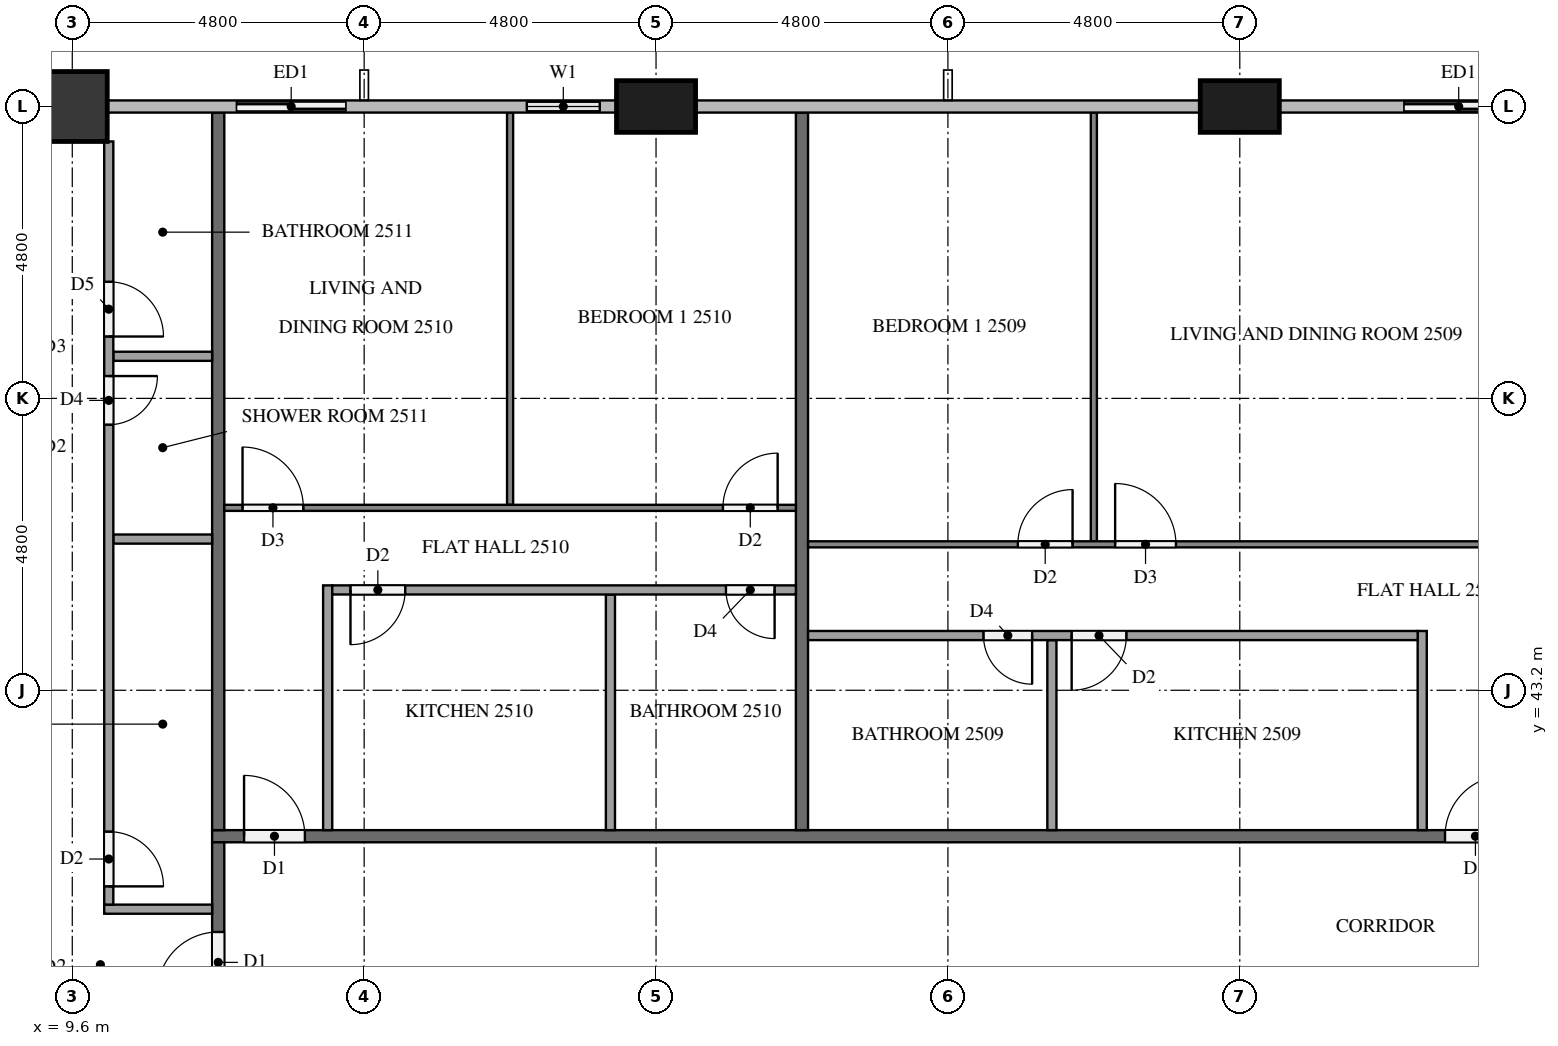
"""IFC4 building model, lengths in metres.
Left out: names, types, materials, properties, quantities, classifications, styles, units other than length and angle.
Written with IfcOpenShell. Run it as: python <this file> out.ifc"""

import sys

from ifc_helpers import new_model, si_unit, direction, frame, frame_2d, origin, origin_2d, place, context, subcontext, project, spatial, rectangle, extrude, element, fill, save


model = new_model("IFC4")
c1 = context("Model", 3, precision=1e-05, world=origin(), true_north=direction((0.0, 1.0)))
c2 = subcontext(c1, "Body", "Model", "MODEL_VIEW")
j1 = project(units=[si_unit("LENGTHUNIT", "METRE"), si_unit("PLANEANGLEUNIT", "RADIAN")], contexts=[c1])
p1 = place(None, origin())
s1 = spatial("IfcSite", under=j1, at=p1, CompositionType="ELEMENT")
p2 = place(p1, origin())
s2 = spatial("IfcBuilding", under=s1, at=p2, CompositionType="ELEMENT")
p3 = place(p2, frame((0.0, 0.0, 99.7)))
s3 = spatial("IfcBuildingStorey", under=s2, at=p3, CompositionType="ELEMENT", Elevation=99.7)
for number, where, z_axis, x_axis in (
    (1, (28.8, 52.8, 0.0), (0.0, 0.0, 1.0), (1.0, 0.0, 0.0)),
    (2, (19.2, 52.8, 0.0), (0.0, 0.0, 1.0), (1.0, 0.0, 0.0)),
):
    element("IfcColumn", number, at=place(p3, frame(where, z_axis=z_axis, x_axis=x_axis)), inside=s3, PredefinedType="COLUMN", context=c2, shape_type="SweptSolid", body=[
        extrude(rectangle(XDim=1.3, YDim=0.85, at=origin_2d()), origin(), (0.0, 0.0, 1.0), 3.2),
    ])
p4 = place(p3, frame((9.6, 52.8, 0.0), z_axis=(0.0, 0.0, 1.0), x_axis=(1.0, 0.0, 0.0)))
e3 = element("IfcColumn", 3, at=p4, inside=s3, PredefinedType="COLUMN", context=c2, shape_type="SweptSolid", body=[
    extrude(rectangle(XDim=1.15, YDim=1.15, at=origin_2d()), origin(), (0.0, 0.0, 1.0), 3.2),
])
p5 = place(p3, frame((33.6, 52.8, 0.0), z_axis=(0.0, 0.0, 1.0), x_axis=(-1.0, 0.0, 0.0)))
e4 = element("IfcWall", 4, at=p5, inside=s3, PredefinedType="SOLIDWALL", context=c2, shape_type="SweptSolid", body=[
    extrude(rectangle(XDim=2.4, YDim=0.15, at=frame_2d((1.2, 0.0))), origin(), (0.0, 0.0, 1.0), 3.2),
])
p6 = place(p5, frame((0.3, 0.0, 0.0)))
e5 = element("IfcOpeningElement", 5, at=p6, cuts=e4, PredefinedType="OPENING", context=c2, shape_type="SweptSolid", body=[
    extrude(rectangle(XDim=1.8, YDim=2.4, at=frame_2d((0.9, 1.2))), frame((0.0, 0.085, 0.0), z_axis=(0.0, -1.0, 0.0), x_axis=(1.0, 0.0, 0.0)), (0.0, 0.0, 1.0), 0.17),
])
p7 = place(p3, frame((18.55, 52.8, 0.0), z_axis=(0.0, 0.0, 1.0), x_axis=(-1.0, 0.0, 0.0)))
e6 = element("IfcWall", 6, at=p7, inside=s3, PredefinedType="SOLIDWALL", context=c2, shape_type="SweptSolid", body=[
    extrude(rectangle(XDim=1.75, YDim=0.15, at=frame_2d((0.875, 0.0))), origin(), (0.0, 0.0, 1.0), 3.2),
])
p8 = place(p7, frame((0.275, 0.0, 0.9)))
e7 = element("IfcOpeningElement", 7, at=p8, cuts=e6, PredefinedType="OPENING", context=c2, shape_type="SweptSolid", body=[
    extrude(rectangle(XDim=1.2, YDim=1.4, at=frame_2d((0.6, 0.7))), frame((0.0, 0.085, 0.0), z_axis=(0.0, -1.0, 0.0), x_axis=(1.0, 0.0, 0.0)), (0.0, 0.0, 1.0), 0.17),
])
p9 = place(p3, frame((14.4, 52.8, 0.0), z_axis=(0.0, 0.0, 1.0), x_axis=(-1.0, 0.0, 0.0)))
e8 = element("IfcWall", 8, at=p9, inside=s3, PredefinedType="SOLIDWALL", context=c2, shape_type="SweptSolid", body=[
    extrude(rectangle(XDim=2.4, YDim=0.15, at=frame_2d((1.2, 0.0))), origin(), (0.0, 0.0, 1.0), 3.2),
])
p10 = place(p9, frame((0.3, 0.0, 0.0)))
e9 = element("IfcOpeningElement", 9, at=p10, cuts=e8, PredefinedType="OPENING", context=c2, shape_type="SweptSolid", body=[
    extrude(rectangle(XDim=1.8, YDim=2.4, at=frame_2d((0.9, 1.2))), frame((0.0, 0.085, 0.0), z_axis=(0.0, -1.0, 0.0), x_axis=(1.0, 0.0, 0.0)), (0.0, 0.0, 1.0), 0.17),
])
p11 = place(p3, frame((11.9, 40.8, 0.0), z_axis=(0.0, 0.0, 1.0), x_axis=(1.0, 0.0, 0.0)))
e10 = element("IfcWall", 10, at=p11, inside=s3, PredefinedType="PARTITIONING", context=c2, shape_type="SweptSolid", body=[
    extrude(rectangle(XDim=38.6, YDim=0.2, at=frame_2d((19.3, 0.0))), origin(), (0.0, 0.0, 1.0), 3.2),
])
p12 = place(p11, frame((22.125, 0.0, 0.0)))
e11 = element("IfcOpeningElement", 11, at=p12, cuts=e10, PredefinedType="OPENING", context=c2, shape_type="SweptSolid", body=[
    extrude(rectangle(XDim=1.0, YDim=2.1, at=frame_2d((0.5, 1.05))), frame((0.0, 0.11, 0.0), z_axis=(0.0, -1.0, 0.0), x_axis=(1.0, 0.0, 0.0)), (0.0, 0.0, 1.0), 0.22),
])
p13 = place(p11, frame((20.275, 0.0, 0.0)))
e12 = element("IfcOpeningElement", 12, at=p13, cuts=e10, PredefinedType="OPENING", context=c2, shape_type="SweptSolid", body=[
    extrude(rectangle(XDim=1.0, YDim=2.1, at=frame_2d((0.5, 1.05))), frame((0.0, 0.11, 0.0), z_axis=(0.0, -1.0, 0.0), x_axis=(1.0, 0.0, 0.0)), (0.0, 0.0, 1.0), 0.22),
])
p14 = place(p11, frame((0.525, 0.0, 0.0)))
e13 = element("IfcOpeningElement", 13, at=p14, cuts=e10, PredefinedType="OPENING", context=c2, shape_type="SweptSolid", body=[
    extrude(rectangle(XDim=1.0, YDim=2.1, at=frame_2d((0.5, 1.05))), frame((0.0, 0.11, 0.0), z_axis=(0.0, -1.0, 0.0), x_axis=(1.0, 0.0, 0.0)), (0.0, 0.0, 1.0), 0.22),
])
p15 = place(p3, frame((12.0, 37.9, 0.0), z_axis=(0.0, 0.0, 1.0), x_axis=(0.0, 1.0, 0.0)))
e14 = element("IfcWall", 14, at=p15, inside=s3, PredefinedType="PARTITIONING", context=c2, shape_type="SweptSolid", body=[
    extrude(rectangle(XDim=2.8, YDim=0.2, at=frame_2d((1.4, 0.0))), origin(), (0.0, 0.0, 1.0), 3.2),
])
p16 = place(p15, frame((0.325, 0.0, 0.0)))
e15 = element("IfcOpeningElement", 15, at=p16, cuts=e14, PredefinedType="OPENING", context=c2, shape_type="SweptSolid", body=[
    extrude(rectangle(XDim=1.0, YDim=2.1, at=frame_2d((0.5, 1.05))), frame((0.0, 0.11, 0.0), z_axis=(0.0, -1.0, 0.0), x_axis=(1.0, 0.0, 0.0)), (0.0, 0.0, 1.0), 0.22),
])
for number, where, z_axis, x_axis in (
    (16, (21.6, 52.7, 0.0), (0.0, 0.0, 1.0), (0.0, -1.0, 0.0)),
    (17, (12.0, 52.7, 0.0), (0.0, 0.0, 1.0), (0.0, -1.0, 0.0)),
):
    element("IfcWall", number, at=place(p3, frame(where, z_axis=z_axis, x_axis=x_axis)), inside=s3, PredefinedType="PARTITIONING", context=c2, shape_type="SweptSolid", body=[
        extrude(rectangle(XDim=11.8, YDim=0.2, at=frame_2d((5.9, 0.0))), origin(), (0.0, 0.0, 1.0), 3.2),
    ])
p17 = place(p3, frame((26.4, 45.65, 0.0), z_axis=(0.0, 0.0, 1.0), x_axis=(0.0, 1.0, 0.0)))
e18 = element("IfcWall", 18, at=p17, inside=s3, PredefinedType="PARTITIONING", context=c2, shape_type="SweptSolid", body=[
    extrude(rectangle(XDim=7.05, YDim=0.1, at=frame_2d((3.525, 0.0))), origin(), (0.0, 0.0, 1.0), 3.2),
])
p18 = place(p3, frame((21.7, 45.6, 0.0), z_axis=(0.0, 0.0, 1.0), x_axis=(1.0, 0.0, 0.0)))
e19 = element("IfcWall", 19, at=p18, inside=s3, PredefinedType="PARTITIONING", context=c2, shape_type="SweptSolid", body=[
    extrude(rectangle(XDim=11.8, YDim=0.1, at=frame_2d((5.9, 0.0))), origin(), (0.0, 0.0, 1.0), 3.2),
])
p19 = place(p18, frame((5.05, 0.0, 0.0)))
e20 = element("IfcOpeningElement", 20, at=p19, cuts=e19, PredefinedType="OPENING", context=c2, shape_type="SweptSolid", body=[
    extrude(rectangle(XDim=1.0, YDim=2.1, at=frame_2d((0.5, 1.05))), frame((0.0, 0.06, 0.0), z_axis=(0.0, -1.0, 0.0), x_axis=(1.0, 0.0, 0.0)), (0.0, 0.0, 1.0), 0.12),
])
p20 = place(p18, frame((3.45, 0.0, 0.0)))
e21 = element("IfcOpeningElement", 21, at=p20, cuts=e19, PredefinedType="OPENING", context=c2, shape_type="SweptSolid", body=[
    extrude(rectangle(XDim=0.9, YDim=2.1, at=frame_2d((0.45, 1.05))), frame((0.0, 0.06, 0.0), z_axis=(0.0, -1.0, 0.0), x_axis=(1.0, 0.0, 0.0)), (0.0, 0.0, 1.0), 0.12),
])
p21 = place(p3, frame((25.71, 40.9, 0.0), z_axis=(0.0, 0.0, 1.0), x_axis=(0.0, 1.0, 0.0)))
e22 = element("IfcWall", 22, at=p21, inside=s3, PredefinedType="PARTITIONING", context=c2, shape_type="SweptSolid", body=[
    extrude(rectangle(XDim=3.125, YDim=0.15, at=frame_2d((1.562, 0.0))), origin(), (0.0, 0.0, 1.0), 3.2),
])
p22 = place(p3, frame((31.8, 40.9, 0.0), z_axis=(0.0, 0.0, 1.0), x_axis=(0.0, 1.0, 0.0)))
e23 = element("IfcWall", 23, at=p22, inside=s3, PredefinedType="PARTITIONING", context=c2, shape_type="SweptSolid", body=[
    extrude(rectangle(XDim=3.275, YDim=0.15, at=frame_2d((1.638, 0.0))), origin(), (0.0, 0.0, 1.0), 3.2),
])
p23 = place(p3, frame((31.725, 44.1, 0.0), z_axis=(0.0, 0.0, 1.0), x_axis=(-1.0, 0.0, 0.0)))
e24 = element("IfcWall", 24, at=p23, inside=s3, PredefinedType="PARTITIONING", context=c2, shape_type="SweptSolid", body=[
    extrude(rectangle(XDim=10.025, YDim=0.15, at=frame_2d((5.013, 0.0))), origin(), (0.0, 0.0, 1.0), 3.2),
])
p24 = place(p23, frame((4.79, 0.0, 0.0)))
e25 = element("IfcOpeningElement", 25, at=p24, cuts=e24, PredefinedType="OPENING", context=c2, shape_type="SweptSolid", body=[
    extrude(rectangle(XDim=0.9, YDim=2.1, at=frame_2d((0.45, 1.05))), frame((0.0, 0.085, 0.0), z_axis=(0.0, -1.0, 0.0), x_axis=(1.0, 0.0, 0.0)), (0.0, 0.0, 1.0), 0.17),
])
p25 = place(p23, frame((6.34, 0.0, 0.0)))
e26 = element("IfcOpeningElement", 26, at=p25, cuts=e24, PredefinedType="OPENING", context=c2, shape_type="SweptSolid", body=[
    extrude(rectangle(XDim=0.8, YDim=2.1, at=frame_2d((0.4, 1.05))), frame((0.0, 0.085, 0.0), z_axis=(0.0, -1.0, 0.0), x_axis=(1.0, 0.0, 0.0)), (0.0, 0.0, 1.0), 0.17),
])
p26 = place(p3, frame((16.8, 46.25, 0.0), z_axis=(0.0, 0.0, 1.0), x_axis=(0.0, 1.0, 0.0)))
e27 = element("IfcWall", 27, at=p26, inside=s3, PredefinedType="PARTITIONING", context=c2, shape_type="SweptSolid", body=[
    extrude(rectangle(XDim=6.45, YDim=0.1, at=frame_2d((3.225, 0.0))), origin(), (0.0, 0.0, 1.0), 3.2),
])
p27 = place(p3, frame((12.1, 46.2, 0.0), z_axis=(0.0, 0.0, 1.0), x_axis=(1.0, 0.0, 0.0)))
e28 = element("IfcWall", 28, at=p27, inside=s3, PredefinedType="PARTITIONING", context=c2, shape_type="SweptSolid", body=[
    extrude(rectangle(XDim=9.4, YDim=0.1, at=frame_2d((4.7, 0.0))), origin(), (0.0, 0.0, 1.0), 3.2),
])
p28 = place(p27, frame((0.3, 0.0, 0.0)))
e29 = element("IfcOpeningElement", 29, at=p28, cuts=e28, PredefinedType="OPENING", context=c2, shape_type="SweptSolid", body=[
    extrude(rectangle(XDim=1.0, YDim=2.1, at=frame_2d((0.5, 1.05))), frame((0.0, 0.06, 0.0), z_axis=(0.0, -1.0, 0.0), x_axis=(1.0, 0.0, 0.0)), (0.0, 0.0, 1.0), 0.12),
])
p29 = place(p27, frame((8.2, 0.0, 0.0)))
e30 = element("IfcOpeningElement", 30, at=p29, cuts=e28, PredefinedType="OPENING", context=c2, shape_type="SweptSolid", body=[
    extrude(rectangle(XDim=0.9, YDim=2.1, at=frame_2d((0.45, 1.05))), frame((0.0, 0.06, 0.0), z_axis=(0.0, -1.0, 0.0), x_axis=(1.0, 0.0, 0.0)), (0.0, 0.0, 1.0), 0.12),
])
p30 = place(p3, frame((18.45, 40.9, 0.0), z_axis=(0.0, 0.0, 1.0), x_axis=(0.0, 1.0, 0.0)))
e31 = element("IfcWall", 31, at=p30, inside=s3, PredefinedType="PARTITIONING", context=c2, shape_type="SweptSolid", body=[
    extrude(rectangle(XDim=3.875, YDim=0.15, at=frame_2d((1.938, 0.0))), origin(), (0.0, 0.0, 1.0), 3.2),
])
p31 = place(p3, frame((13.8, 40.9, 0.0), z_axis=(0.0, 0.0, 1.0), x_axis=(0.0, 1.0, 0.0)))
e32 = element("IfcWall", 32, at=p31, inside=s3, PredefinedType="PARTITIONING", context=c2, shape_type="SweptSolid", body=[
    extrude(rectangle(XDim=4.025, YDim=0.15, at=frame_2d((2.013, 0.0))), origin(), (0.0, 0.0, 1.0), 3.2),
])
p32 = place(p3, frame((21.5, 44.85, 0.0), z_axis=(0.0, 0.0, 1.0), x_axis=(-1.0, 0.0, 0.0)))
e33 = element("IfcWall", 33, at=p32, inside=s3, PredefinedType="PARTITIONING", context=c2, shape_type="SweptSolid", body=[
    extrude(rectangle(XDim=7.625, YDim=0.15, at=frame_2d((3.812, 0.0))), origin(), (0.0, 0.0, 1.0), 3.2),
])
p33 = place(p32, frame((6.425, 0.0, 0.0)))
e34 = element("IfcOpeningElement", 34, at=p33, cuts=e33, PredefinedType="OPENING", context=c2, shape_type="SweptSolid", body=[
    extrude(rectangle(XDim=0.9, YDim=2.1, at=frame_2d((0.45, 1.05))), frame((0.0, 0.085, 0.0), z_axis=(0.0, -1.0, 0.0), x_axis=(1.0, 0.0, 0.0)), (0.0, 0.0, 1.0), 0.17),
])
p34 = place(p32, frame((0.35, 0.0, 0.0)))
e35 = element("IfcOpeningElement", 35, at=p34, cuts=e33, PredefinedType="OPENING", context=c2, shape_type="SweptSolid", body=[
    extrude(rectangle(XDim=0.8, YDim=2.1, at=frame_2d((0.4, 1.05))), frame((0.0, 0.085, 0.0), z_axis=(0.0, -1.0, 0.0), x_axis=(1.0, 0.0, 0.0)), (0.0, 0.0, 1.0), 0.17),
])
for number, where, z_axis, x_axis in (
    (36, (11.9, 45.687, 0.0), (0.0, 0.0, 1.0), (-1.0, 0.0, 0.0)),
    (37, (11.9, 48.692, 0.0), (0.0, 0.0, 1.0), (-1.0, 0.0, 0.0)),
):
    element("IfcWall", number, at=place(p3, frame(where, z_axis=z_axis, x_axis=x_axis)), inside=s3, PredefinedType="PARTITIONING", context=c2, shape_type="SweptSolid", body=[
        extrude(rectangle(XDim=1.625, YDim=0.15, at=frame_2d((0.812, 0.0))), origin(), (0.0, 0.0, 1.0), 3.2),
    ])
p35 = place(p3, frame((11.9, 39.6, 0.0), z_axis=(0.0, 0.0, 1.0), x_axis=(-1.0, 0.0, 0.0)))
e38 = element("IfcWall", 38, at=p35, inside=s3, PredefinedType="PARTITIONING", context=c2, shape_type="SweptSolid", body=[
    extrude(rectangle(XDim=1.775, YDim=0.15, at=frame_2d((0.887, 0.0))), origin(), (0.0, 0.0, 1.0), 3.2),
])
p36 = place(p3, frame((10.2, 52.225, 0.0), z_axis=(0.0, 0.0, 1.0), x_axis=(0.0, -1.0, 0.0)))
e39 = element("IfcWall", 39, at=p36, inside=s3, PredefinedType="PARTITIONING", context=c2, shape_type="SweptSolid", body=[
    extrude(rectangle(XDim=12.55, YDim=0.15, at=frame_2d((6.275, 0.0))), origin(), (0.0, 0.0, 1.0), 3.2),
])
p37 = place(p36, frame((11.35, 0.0, 0.0)))
e40 = element("IfcOpeningElement", 40, at=p37, cuts=e39, PredefinedType="OPENING", context=c2, shape_type="SweptSolid", body=[
    extrude(rectangle(XDim=0.9, YDim=2.1, at=frame_2d((0.45, 1.05))), frame((0.0, 0.085, 0.0), z_axis=(0.0, -1.0, 0.0), x_axis=(1.0, 0.0, 0.0)), (0.0, 0.0, 1.0), 0.17),
])
p38 = place(p36, frame((3.858, 0.0, 0.0)))
e41 = element("IfcOpeningElement", 41, at=p38, cuts=e39, PredefinedType="OPENING", context=c2, shape_type="SweptSolid", body=[
    extrude(rectangle(XDim=0.8, YDim=2.1, at=frame_2d((0.4, 1.05))), frame((0.0, 0.085, 0.0), z_axis=(0.0, -1.0, 0.0), x_axis=(1.0, 0.0, 0.0)), (0.0, 0.0, 1.0), 0.17),
])
p39 = place(p36, frame((2.308, 0.0, 0.0)))
e42 = element("IfcOpeningElement", 42, at=p39, cuts=e39, PredefinedType="OPENING", context=c2, shape_type="SweptSolid", body=[
    extrude(rectangle(XDim=0.9, YDim=2.1, at=frame_2d((0.45, 1.05))), frame((0.0, 0.085, 0.0), z_axis=(0.0, -1.0, 0.0), x_axis=(1.0, 0.0, 0.0)), (0.0, 0.0, 1.0), 0.17),
])
p40 = place(p6, origin())
e43 = element("IfcDoor", 43, at=p40, inside=s3, OperationType="SLIDING_TO_LEFT", PredefinedType="DOOR", context=c2, shape_type="SweptSolid", body=[
    extrude(rectangle(XDim=1.8, YDim=2.4, at=frame_2d((0.9, 1.2))), frame((0.0, 0.025, 0.0), z_axis=(0.0, -1.0, 0.0), x_axis=(1.0, 0.0, 0.0)), (0.0, 0.0, 1.0), 0.05),
])
fill(e5, e43)
p41 = place(p8, origin())
e44 = element("IfcWindow", 44, at=p41, inside=s3, PartitioningType="SINGLE_PANEL", PredefinedType="WINDOW", context=c2, shape_type="SweptSolid", body=[
    extrude(rectangle(XDim=1.2, YDim=1.4, at=frame_2d((0.6, 0.7))), frame((0.0, 0.03, 0.0), z_axis=(0.0, -1.0, 0.0), x_axis=(1.0, 0.0, 0.0)), (0.0, 0.0, 1.0), 0.06),
])
fill(e7, e44)
p42 = place(p10, origin())
e45 = element("IfcDoor", 45, at=p42, inside=s3, OperationType="SLIDING_TO_RIGHT", PredefinedType="DOOR", context=c2, shape_type="SweptSolid", body=[
    extrude(rectangle(XDim=1.8, YDim=2.4, at=frame_2d((0.9, 1.2))), frame((0.0, 0.025, 0.0), z_axis=(0.0, -1.0, 0.0), x_axis=(1.0, 0.0, 0.0)), (0.0, 0.0, 1.0), 0.05),
])
fill(e9, e45)
p43 = place(p13, origin())
e46 = element("IfcDoor", 46, at=p43, inside=s3, OperationType="SINGLE_SWING_RIGHT", PredefinedType="DOOR", context=c2, shape_type="SweptSolid", body=[
    extrude(rectangle(XDim=1.0, YDim=2.1, at=frame_2d((0.5, 1.05))), frame((0.0, 0.025, 0.0), z_axis=(0.0, -1.0, 0.0), x_axis=(1.0, 0.0, 0.0)), (0.0, 0.0, 1.0), 0.05),
])
fill(e12, e46)
p44 = place(p14, origin())
e47 = element("IfcDoor", 47, at=p44, inside=s3, OperationType="SINGLE_SWING_LEFT", PredefinedType="DOOR", context=c2, shape_type="SweptSolid", body=[
    extrude(rectangle(XDim=1.0, YDim=2.1, at=frame_2d((0.5, 1.05))), frame((0.0, 0.025, 0.0), z_axis=(0.0, -1.0, 0.0), x_axis=(1.0, 0.0, 0.0)), (0.0, 0.0, 1.0), 0.05),
])
fill(e13, e47)
p45 = place(p16, origin())
e48 = element("IfcDoor", 48, at=p45, inside=s3, OperationType="SINGLE_SWING_LEFT", PredefinedType="DOOR", context=c2, shape_type="SweptSolid", body=[
    extrude(rectangle(XDim=1.0, YDim=2.1, at=frame_2d((0.5, 1.05))), frame((0.0, 0.025, 0.0), z_axis=(0.0, -1.0, 0.0), x_axis=(1.0, 0.0, 0.0)), (0.0, 0.0, 1.0), 0.05),
])
fill(e15, e48)
p46 = place(p19, origin())
e49 = element("IfcDoor", 49, at=p46, inside=s3, OperationType="SINGLE_SWING_LEFT", PredefinedType="DOOR", context=c2, shape_type="SweptSolid", body=[
    extrude(rectangle(XDim=1.0, YDim=2.1, at=frame_2d((0.5, 1.05))), frame((0.0, 0.025, 0.0), z_axis=(0.0, -1.0, 0.0), x_axis=(1.0, 0.0, 0.0)), (0.0, 0.0, 1.0), 0.05),
])
fill(e20, e49)
p47 = place(p20, origin())
e50 = element("IfcDoor", 50, at=p47, inside=s3, OperationType="SINGLE_SWING_RIGHT", PredefinedType="DOOR", context=c2, shape_type="SweptSolid", body=[
    extrude(rectangle(XDim=0.9, YDim=2.1, at=frame_2d((0.45, 1.05))), frame((0.0, 0.025, 0.0), z_axis=(0.0, -1.0, 0.0), x_axis=(1.0, 0.0, 0.0)), (0.0, 0.0, 1.0), 0.05),
])
fill(e21, e50)
p48 = place(p24, origin())
e51 = element("IfcDoor", 51, at=p48, inside=s3, OperationType="SINGLE_SWING_RIGHT", PredefinedType="DOOR", context=c2, shape_type="SweptSolid", body=[
    extrude(rectangle(XDim=0.9, YDim=2.1, at=frame_2d((0.45, 1.05))), frame((0.0, 0.025, 0.0), z_axis=(0.0, -1.0, 0.0), x_axis=(1.0, 0.0, 0.0)), (0.0, 0.0, 1.0), 0.05),
])
fill(e25, e51)
p49 = place(p25, origin())
e52 = element("IfcDoor", 52, at=p49, inside=s3, OperationType="SINGLE_SWING_LEFT", PredefinedType="DOOR", context=c2, shape_type="SweptSolid", body=[
    extrude(rectangle(XDim=0.8, YDim=2.1, at=frame_2d((0.4, 1.05))), frame((0.0, 0.025, 0.0), z_axis=(0.0, -1.0, 0.0), x_axis=(1.0, 0.0, 0.0)), (0.0, 0.0, 1.0), 0.05),
])
fill(e26, e52)
p50 = place(p28, origin())
e53 = element("IfcDoor", 53, at=p50, inside=s3, OperationType="SINGLE_SWING_LEFT", PredefinedType="DOOR", context=c2, shape_type="SweptSolid", body=[
    extrude(rectangle(XDim=1.0, YDim=2.1, at=frame_2d((0.5, 1.05))), frame((0.0, 0.025, 0.0), z_axis=(0.0, -1.0, 0.0), x_axis=(1.0, 0.0, 0.0)), (0.0, 0.0, 1.0), 0.05),
])
fill(e29, e53)
p51 = place(p29, origin())
e54 = element("IfcDoor", 54, at=p51, inside=s3, OperationType="SINGLE_SWING_RIGHT", PredefinedType="DOOR", context=c2, shape_type="SweptSolid", body=[
    extrude(rectangle(XDim=0.9, YDim=2.1, at=frame_2d((0.45, 1.05))), frame((0.0, 0.025, 0.0), z_axis=(0.0, -1.0, 0.0), x_axis=(1.0, 0.0, 0.0)), (0.0, 0.0, 1.0), 0.05),
])
fill(e30, e54)
p52 = place(p33, origin())
e55 = element("IfcDoor", 55, at=p52, inside=s3, OperationType="SINGLE_SWING_RIGHT", PredefinedType="DOOR", context=c2, shape_type="SweptSolid", body=[
    extrude(rectangle(XDim=0.9, YDim=2.1, at=frame_2d((0.45, 1.05))), frame((0.0, 0.025, 0.0), z_axis=(0.0, -1.0, 0.0), x_axis=(1.0, 0.0, 0.0)), (0.0, 0.0, 1.0), 0.05),
])
fill(e34, e55)
p53 = place(p34, origin())
e56 = element("IfcDoor", 56, at=p53, inside=s3, OperationType="SINGLE_SWING_LEFT", PredefinedType="DOOR", context=c2, shape_type="SweptSolid", body=[
    extrude(rectangle(XDim=0.8, YDim=2.1, at=frame_2d((0.4, 1.05))), frame((0.0, 0.025, 0.0), z_axis=(0.0, -1.0, 0.0), x_axis=(1.0, 0.0, 0.0)), (0.0, 0.0, 1.0), 0.05),
])
fill(e35, e56)
p54 = place(p37, origin())
e57 = element("IfcDoor", 57, at=p54, inside=s3, OperationType="SINGLE_SWING_RIGHT", PredefinedType="DOOR", context=c2, shape_type="SweptSolid", body=[
    extrude(rectangle(XDim=0.9, YDim=2.1, at=frame_2d((0.45, 1.05))), frame((0.0, 0.025, 0.0), z_axis=(0.0, -1.0, 0.0), x_axis=(1.0, 0.0, 0.0)), (0.0, 0.0, 1.0), 0.05),
])
fill(e40, e57)
p55 = place(p38, origin())
e58 = element("IfcDoor", 58, at=p55, inside=s3, OperationType="SINGLE_SWING_LEFT", PredefinedType="DOOR", context=c2, shape_type="SweptSolid", body=[
    extrude(rectangle(XDim=0.8, YDim=2.1, at=frame_2d((0.4, 1.05))), frame((0.0, 0.025, 0.0), z_axis=(0.0, -1.0, 0.0), x_axis=(1.0, 0.0, 0.0)), (0.0, 0.0, 1.0), 0.05),
])
fill(e41, e58)
p56 = place(p39, origin())
e59 = element("IfcDoor", 59, at=p56, inside=s3, OperationType="SINGLE_SWING_RIGHT", PredefinedType="DOOR", context=c2, shape_type="SweptSolid", body=[
    extrude(rectangle(XDim=0.9, YDim=2.1, at=frame_2d((0.45, 1.05))), frame((0.0, 0.025, 0.0), z_axis=(0.0, -1.0, 0.0), x_axis=(1.0, 0.0, 0.0)), (0.0, 0.0, 1.0), 0.05),
])
fill(e42, e59)
save(model, sys.argv[1])
